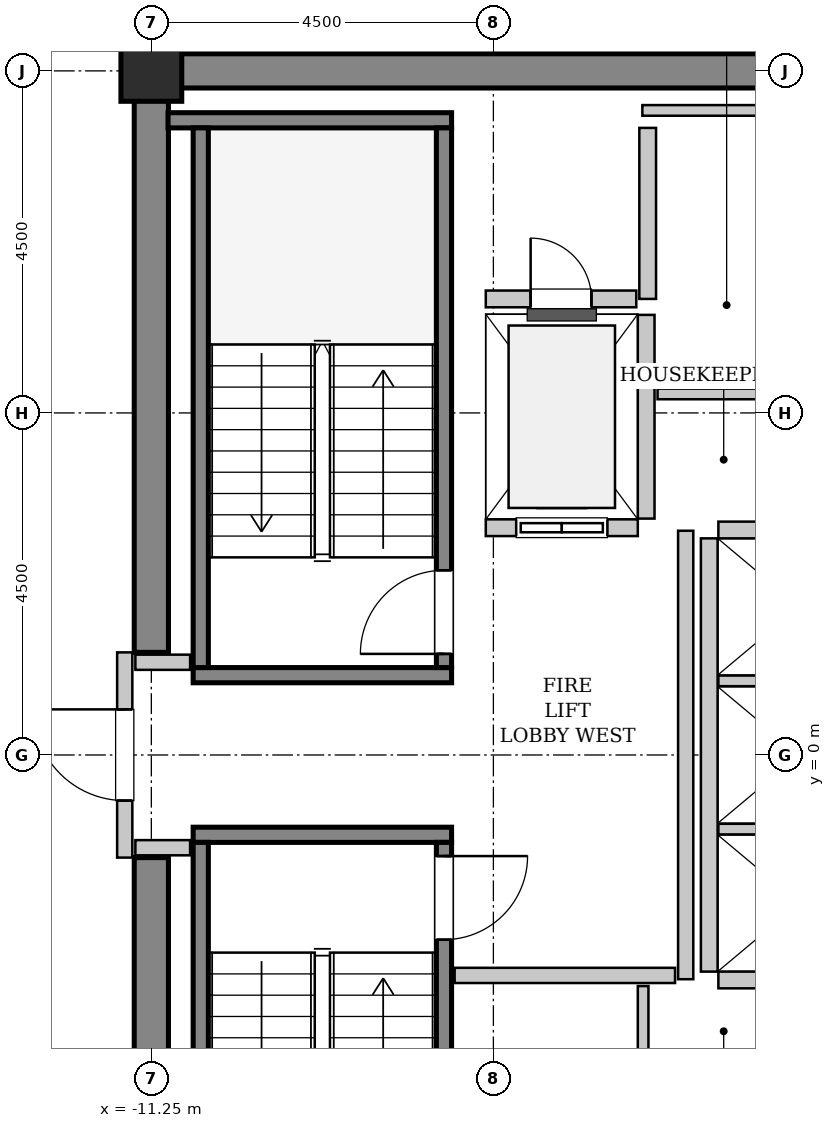
"""IFC4 building model, lengths in metres.
Left out: names, types, materials, properties, quantities, classifications, styles, units other than length and angle.
Written with IfcOpenShell. Run it as: python <this file> out.ifc"""

import sys

from ifc_helpers import new_model, si_unit, direction, frame, frame_2d, origin, origin_2d, place, context, subcontext, project, spatial, rectangle, hollow_rectangle, extrude, source, transform, mapped, element, fill, save


model = new_model("IFC4")
c1 = context("Model", 3, precision=1e-05, world=origin(), true_north=direction((0.0, 1.0)))
c2 = subcontext(c1, "Body", "Model", "MODEL_VIEW")
j1 = project(units=[si_unit("LENGTHUNIT", "METRE"), si_unit("PLANEANGLEUNIT", "RADIAN")], contexts=[c1])
p1 = place(None, origin())
s1 = spatial("IfcSite", under=j1, at=p1, CompositionType="ELEMENT")
p2 = place(p1, origin())
s2 = spatial("IfcBuilding", under=s1, at=p2, CompositionType="ELEMENT")
p3 = place(p2, frame((0.0, 0.0, 206.6)))
s3 = spatial("IfcBuildingStorey", under=s2, at=p3, CompositionType="ELEMENT", Elevation=206.6)
m1 = source(origin(), c2, "Body", "SweptSolid", [
    extrude(rectangle(XDim=9.925, YDim=0.45, at=frame_2d((4.962, 0.0))), origin(), (0.0, 0.0, 1.0), 3.8),
])
p4 = place(p3, frame((-11.475, 9.0, 0.0), z_axis=(0.0, 0.0, 1.0), x_axis=(1.0, 0.0, 0.0)))
e1 = element("IfcWall", 1, at=p4, inside=s3, PredefinedType="SHEAR", context=c2, shape_type="MappedRepresentation", body=[
    mapped(m1, transform((0.0, 0.0, 0.0), x_axis=(1.0, 0.0, 0.0), y_axis=(0.0, 1.0, 0.0), z_axis=(0.0, 0.0, 1.0), scale=1.0)),
])
m2 = source(origin(), c2, "Body", "SweptSolid", [
    extrude(rectangle(XDim=7.425, YDim=0.45, at=frame_2d((3.712, 0.0))), origin(), (0.0, 0.0, 1.0), 3.8),
])
for number, where, z_axis, x_axis in (
    (2, (-11.25, -8.775, 0.0), (0.0, 0.0, 1.0), (0.0, 1.0, 0.0)),
    (3, (-11.25, 1.35, 0.0), (0.0, 0.0, 1.0), (0.0, 1.0, 0.0)),
):
    element("IfcWall", number, at=place(p3, frame(where, z_axis=z_axis, x_axis=x_axis)), inside=s3, PredefinedType="SHEAR", context=c2, shape_type="MappedRepresentation", body=[
        mapped(m2, transform((0.0, 0.0, 0.0), x_axis=(1.0, 0.0, 0.0), y_axis=(0.0, 1.0, 0.0), z_axis=(0.0, 0.0, 1.0), scale=1.0)),
    ])
m3 = source(origin(), c2, "Body", "SweptSolid", [
    extrude(hollow_rectangle(XDim=0.8, YDim=0.8, WallThickness=0.04, InnerFilletRadius=0.04, OuterFilletRadius=0.08, at=origin_2d()), origin(), (0.0, 0.0, 1.0), 3.8),
])
p5 = place(p3, frame((-11.25, 9.0, 0.0), z_axis=(0.0, 0.0, 1.0), x_axis=(1.0, 0.0, 0.0)))
e4 = element("IfcColumn", 4, at=p5, inside=s3, PredefinedType="COLUMN", context=c2, shape_type="MappedRepresentation", body=[
    mapped(m3, transform((0.0, 0.0, 0.0), x_axis=(1.0, 0.0, 0.0), y_axis=(0.0, 1.0, 0.0), z_axis=(0.0, 0.0, 1.0), scale=1.0)),
])
m4 = source(origin(), c2, "Body", "SweptSolid", [
    extrude(rectangle(XDim=3.4, YDim=0.2, at=frame_2d((1.7, 0.0))), origin(), (0.0, 0.0, 1.0), 3.8),
])
p6 = place(p3, frame((-7.3, 1.05, 0.0), z_axis=(0.0, 0.0, 1.0), x_axis=(-1.0, 0.0, 0.0)))
e5 = element("IfcWall", 5, at=p6, inside=s3, PredefinedType="SOLIDWALL", context=c2, shape_type="MappedRepresentation", body=[
    mapped(m4, transform((0.0, 0.0, 0.0), x_axis=(1.0, 0.0, 0.0), y_axis=(0.0, 1.0, 0.0), z_axis=(0.0, 0.0, 1.0), scale=1.0)),
])
m5 = source(origin(), c2, "Body", "SweptSolid", [
    extrude(rectangle(XDim=3.73, YDim=0.2, at=frame_2d((1.865, 0.0))), origin(), (0.0, 0.0, 1.0), 3.8),
])
p7 = place(p3, frame((-7.3, 8.35, 0.0), z_axis=(0.0, 0.0, 1.0), x_axis=(-1.0, 0.0, 0.0)))
e6 = element("IfcWall", 6, at=p7, inside=s3, PredefinedType="SOLIDWALL", context=c2, shape_type="MappedRepresentation", body=[
    mapped(m5, transform((0.0, 0.0, 0.0), x_axis=(1.0, 0.0, 0.0), y_axis=(0.0, 1.0, 0.0), z_axis=(0.0, 0.0, 1.0), scale=1.0)),
])
m6 = source(origin(), c2, "Body", "SweptSolid", [
    extrude(rectangle(XDim=7.1, YDim=0.2, at=frame_2d((3.55, 0.0))), origin(), (0.0, 0.0, 1.0), 3.8),
])
p8 = place(p3, frame((-7.4, 1.15, 0.0), z_axis=(0.0, 0.0, 1.0), x_axis=(0.0, 1.0, 0.0)))
e7 = element("IfcWall", 7, at=p8, inside=s3, PredefinedType="SOLIDWALL", context=c2, shape_type="MappedRepresentation", body=[
    mapped(m6, transform((0.0, 0.0, 0.0), x_axis=(1.0, 0.0, 0.0), y_axis=(0.0, 1.0, 0.0), z_axis=(0.0, 0.0, 1.0), scale=1.0)),
])
p9 = place(p8, frame((0.18, 0.0, 0.0)))
e8 = element("IfcOpeningElement", 8, at=p9, cuts=e7, PredefinedType="OPENING", context=c2, shape_type="SweptSolid", body=[
    extrude(rectangle(XDim=1.1, YDim=2.15, at=frame_2d((0.55, 1.075))), frame((0.0, 0.11, 0.0), z_axis=(0.0, -1.0, 0.0), x_axis=(1.0, 0.0, 0.0)), (0.0, 0.0, 1.0), 0.22),
])
p10 = place(p3, frame((-10.6, 1.15, 0.0), z_axis=(0.0, 0.0, 1.0), x_axis=(0.0, 1.0, 0.0)))
e9 = element("IfcWall", 9, at=p10, inside=s3, PredefinedType="SOLIDWALL", context=c2, shape_type="MappedRepresentation", body=[
    mapped(m6, transform((0.0, 0.0, 0.0), x_axis=(1.0, 0.0, 0.0), y_axis=(0.0, 1.0, 0.0), z_axis=(0.0, 0.0, 1.0), scale=1.0)),
])
p11 = place(p3, frame((-10.7, -1.05, 0.0), z_axis=(0.0, 0.0, 1.0), x_axis=(1.0, 0.0, 0.0)))
e10 = element("IfcWall", 10, at=p11, inside=s3, PredefinedType="SOLIDWALL", context=c2, shape_type="MappedRepresentation", body=[
    mapped(m4, transform((0.0, 0.0, 0.0), x_axis=(1.0, 0.0, 0.0), y_axis=(0.0, 1.0, 0.0), z_axis=(0.0, 0.0, 1.0), scale=1.0)),
])
p12 = place(p3, frame((-10.6, -1.15, 0.0), z_axis=(0.0, 0.0, 1.0), x_axis=(0.0, -1.0, 0.0)))
e11 = element("IfcWall", 11, at=p12, inside=s3, PredefinedType="SOLIDWALL", context=c2, shape_type="MappedRepresentation", body=[
    mapped(m6, transform((0.0, 0.0, 0.0), x_axis=(1.0, 0.0, 0.0), y_axis=(0.0, 1.0, 0.0), z_axis=(0.0, 0.0, 1.0), scale=1.0)),
])
p13 = place(p3, frame((-7.4, -1.15, 0.0), z_axis=(0.0, 0.0, 1.0), x_axis=(0.0, -1.0, 0.0)))
e12 = element("IfcWall", 12, at=p13, inside=s3, PredefinedType="SOLIDWALL", context=c2, shape_type="MappedRepresentation", body=[
    mapped(m6, transform((0.0, 0.0, 0.0), x_axis=(1.0, 0.0, 0.0), y_axis=(0.0, 1.0, 0.0), z_axis=(0.0, 0.0, 1.0), scale=1.0)),
])
p14 = place(p13, frame((0.18, 0.0, 0.0)))
e13 = element("IfcOpeningElement", 13, at=p14, cuts=e12, PredefinedType="OPENING", context=c2, shape_type="SweptSolid", body=[
    extrude(rectangle(XDim=1.1, YDim=2.15, at=frame_2d((0.55, 1.075))), frame((0.0, 0.11, 0.0), z_axis=(0.0, -1.0, 0.0), x_axis=(1.0, 0.0, 0.0)), (0.0, 0.0, 1.0), 0.22),
])
m7 = source(origin(), c2, "Body", "SweptSolid", [
    extrude(rectangle(XDim=2.0, YDim=0.22, at=frame_2d((1.0, 0.0))), origin(), (0.0, 0.0, 1.0), 3.535),
])
p15 = place(p3, frame((-6.85, 2.99, 0.0), z_axis=(0.0, 0.0, 1.0), x_axis=(1.0, 0.0, 0.0)))
e14 = element("IfcWall", 14, at=p15, inside=s3, PredefinedType="SOLIDWALL", context=c2, shape_type="MappedRepresentation", body=[
    mapped(m7, transform((0.0, 0.0, 0.0), x_axis=(1.0, 0.0, 0.0), y_axis=(0.0, 1.0, 0.0), z_axis=(0.0, 0.0, 1.0), scale=1.0)),
])
p16 = place(p15, frame((0.4, 0.0, 0.0)))
e15 = element("IfcOpeningElement", 15, at=p16, cuts=e14, PredefinedType="OPENING", context=c2, shape_type="SweptSolid", body=[
    extrude(rectangle(XDim=1.2, YDim=2.2, at=frame_2d((0.6, 1.1))), frame((0.0, 0.12, 0.0), z_axis=(0.0, -1.0, 0.0), x_axis=(1.0, 0.0, 0.0)), (0.0, 0.0, 1.0), 0.24),
])
m8 = source(origin(), c2, "Body", "SweptSolid", [
    extrude(rectangle(XDim=2.68, YDim=0.22, at=frame_2d((1.34, 0.0))), origin(), (0.0, 0.0, 1.0), 3.535),
])
p17 = place(p3, frame((-4.74, 3.11, 0.0), z_axis=(0.0, 0.0, 1.0), x_axis=(0.0, 1.0, 0.0)))
e16 = element("IfcWall", 16, at=p17, inside=s3, PredefinedType="SOLIDWALL", context=c2, shape_type="MappedRepresentation", body=[
    mapped(m8, transform((0.0, 0.0, 0.0), x_axis=(1.0, 0.0, 0.0), y_axis=(0.0, 1.0, 0.0), z_axis=(0.0, 0.0, 1.0), scale=1.0)),
])
m9 = source(origin(), c2, "Body", "SweptSolid", [
    extrude(rectangle(XDim=5.7, YDim=0.22, at=frame_2d((2.85, 0.0))), origin(), (0.0, 0.0, 1.0), 3.535),
])
p18 = place(p3, frame((-3.91, 2.85, 0.0), z_axis=(0.0, 0.0, 1.0), x_axis=(0.0, -1.0, 0.0)))
e17 = element("IfcWall", 17, at=p18, inside=s3, PredefinedType="SOLIDWALL", context=c2, shape_type="MappedRepresentation", body=[
    mapped(m9, transform((0.0, 0.0, 0.0), x_axis=(1.0, 0.0, 0.0), y_axis=(0.0, 1.0, 0.0), z_axis=(0.0, 0.0, 1.0), scale=1.0)),
])
m10 = source(origin(), c2, "Body", "SweptSolid", [
    extrude(rectangle(XDim=2.13, YDim=0.22, at=frame_2d((1.065, 0.0))), origin(), (0.0, 0.0, 1.0), 3.535),
])
p19 = place(p3, frame((-3.79, -2.96, 0.0), z_axis=(0.0, 0.0, 1.0), x_axis=(1.0, 0.0, 0.0)))
e18 = element("IfcWall", 18, at=p19, inside=s3, PredefinedType="SOLIDWALL", context=c2, shape_type="MappedRepresentation", body=[
    mapped(m10, transform((0.0, 0.0, 0.0), x_axis=(1.0, 0.0, 0.0), y_axis=(0.0, 1.0, 0.0), z_axis=(0.0, 0.0, 1.0), scale=1.0)),
])
m11 = source(origin(), c2, "Body", "SweptSolid", [
    extrude(rectangle(XDim=2.13, YDim=0.14, at=frame_2d((1.065, 0.0))), origin(), (0.0, 0.0, 1.0), 3.535),
])
for number, where, z_axis, x_axis in (
    (19, (-3.79, -0.975, 0.0), (0.0, 0.0, 1.0), (1.0, 0.0, 0.0)),
    (20, (-3.79, 0.975, 0.0), (0.0, 0.0, 1.0), (1.0, 0.0, 0.0)),
):
    element("IfcWall", number, at=place(p3, frame(where, z_axis=z_axis, x_axis=x_axis)), inside=s3, PredefinedType="PARTITIONING", context=c2, shape_type="MappedRepresentation", body=[
        mapped(m11, transform((0.0, 0.0, 0.0), x_axis=(1.0, 0.0, 0.0), y_axis=(0.0, 1.0, 0.0), z_axis=(0.0, 0.0, 1.0), scale=1.0)),
    ])
p20 = place(p3, frame((-1.66, 2.96, 0.0), z_axis=(0.0, 0.0, 1.0), x_axis=(-1.0, 0.0, 0.0)))
e21 = element("IfcWall", 21, at=p20, inside=s3, PredefinedType="SOLIDWALL", context=c2, shape_type="MappedRepresentation", body=[
    mapped(m10, transform((0.0, 0.0, 0.0), x_axis=(1.0, 0.0, 0.0), y_axis=(0.0, 1.0, 0.0), z_axis=(0.0, 0.0, 1.0), scale=1.0)),
])
m12 = source(origin(), c2, "Body", "SweptSolid", [
    extrude(rectangle(XDim=2.25, YDim=0.22, at=frame_2d((1.125, 0.0))), origin(), (0.0, 0.0, 1.0), 3.535),
])
p21 = place(p3, frame((-4.72, 6.0, 0.0), z_axis=(0.0, 0.0, 1.0), x_axis=(0.0, 1.0, 0.0)))
e22 = element("IfcWall", 22, at=p21, inside=s3, PredefinedType="SOLIDWALL", context=c2, shape_type="MappedRepresentation", body=[
    mapped(m12, transform((0.0, 0.0, 0.0), x_axis=(1.0, 0.0, 0.0), y_axis=(0.0, 1.0, 0.0), z_axis=(0.0, 0.0, 1.0), scale=1.0)),
])
m13 = source(origin(), c2, "Body", "SweptSolid", [
    extrude(rectangle(XDim=1.98, YDim=0.22, at=frame_2d((0.99, 0.0))), origin(), (0.0, 0.0, 1.0), 3.535),
])
p22 = place(p3, frame((-6.85, 6.0, 0.0), z_axis=(0.0, 0.0, 1.0), x_axis=(1.0, 0.0, 0.0)))
e23 = element("IfcWall", 23, at=p22, inside=s3, PredefinedType="SOLIDWALL", context=c2, shape_type="MappedRepresentation", body=[
    mapped(m13, transform((0.0, 0.0, 0.0), x_axis=(1.0, 0.0, 0.0), y_axis=(0.0, 1.0, 0.0), z_axis=(0.0, 0.0, 1.0), scale=1.0)),
])
p23 = place(p22, frame((0.59, 0.0, 0.0)))
e24 = element("IfcOpeningElement", 24, at=p23, cuts=e23, PredefinedType="OPENING", context=c2, shape_type="SweptSolid", body=[
    extrude(rectangle(XDim=0.8, YDim=2.0, at=frame_2d((0.4, 1.0))), frame((0.0, 0.12, 0.0), z_axis=(0.0, -1.0, 0.0), x_axis=(1.0, 0.0, 0.0)), (0.0, 0.0, 1.0), 0.24),
])
m14 = source(origin(), c2, "Body", "SweptSolid", [
    extrude(rectangle(XDim=2.7, YDim=0.2, at=frame_2d((1.35, 0.0))), origin(), (0.0, 0.0, 1.0), 2.625),
])
p24 = place(p3, frame((-11.6, -1.35, 0.0), z_axis=(0.0, 0.0, 1.0), x_axis=(0.0, 1.0, 0.0)))
e25 = element("IfcWall", 25, at=p24, inside=s3, PredefinedType="PARTITIONING", context=c2, shape_type="MappedRepresentation", body=[
    mapped(m14, transform((0.0, 0.0, 0.0), x_axis=(1.0, 0.0, 0.0), y_axis=(0.0, 1.0, 0.0), z_axis=(0.0, 0.0, 1.0), scale=1.0)),
])
p25 = place(p24, frame((0.75, 0.0, 0.0)))
e26 = element("IfcOpeningElement", 26, at=p25, cuts=e25, PredefinedType="OPENING", context=c2, shape_type="SweptSolid", body=[
    extrude(rectangle(XDim=1.2, YDim=2.15, at=frame_2d((0.6, 1.075))), frame((0.0, 0.11, 0.0), z_axis=(0.0, -1.0, 0.0), x_axis=(1.0, 0.0, 0.0)), (0.0, 0.0, 1.0), 0.22),
])
m15 = source(origin(), c2, "Body", "SweptSolid", [
    extrude(rectangle(XDim=5.9, YDim=0.2, at=frame_2d((2.95, 0.0))), origin(), (0.0, 0.0, 1.0), 3.535),
])
p26 = place(p3, frame((-4.22, -2.95, 0.0), z_axis=(0.0, 0.0, 1.0), x_axis=(0.0, 1.0, 0.0)))
e27 = element("IfcWall", 27, at=p26, inside=s3, PredefinedType="PARTITIONING", context=c2, shape_type="MappedRepresentation", body=[
    mapped(m15, transform((0.0, 0.0, 0.0), x_axis=(1.0, 0.0, 0.0), y_axis=(0.0, 1.0, 0.0), z_axis=(0.0, 0.0, 1.0), scale=1.0)),
])
m16 = source(origin(), c2, "Body", "SweptSolid", [
    extrude(rectangle(XDim=2.9, YDim=0.2, at=frame_2d((1.45, 0.0))), origin(), (0.0, 0.0, 1.0), 3.535),
])
p27 = place(p3, frame((-7.26, -2.9, 0.0), z_axis=(0.0, 0.0, 1.0), x_axis=(1.0, 0.0, 0.0)))
e28 = element("IfcWall", 28, at=p27, inside=s3, PredefinedType="PARTITIONING", context=c2, shape_type="MappedRepresentation", body=[
    mapped(m16, transform((0.0, 0.0, 0.0), x_axis=(1.0, 0.0, 0.0), y_axis=(0.0, 1.0, 0.0), z_axis=(0.0, 0.0, 1.0), scale=1.0)),
])
m17 = source(origin(), c2, "Body", "SweptSolid", [
    extrude(rectangle(XDim=0.72, YDim=0.2, at=frame_2d((0.36, 0.0))), origin(), (0.0, 0.0, 1.0), 3.535),
])
for number, where, z_axis, x_axis in (
    (29, (-11.46, 1.22, 0.0), (0.0, 0.0, 1.0), (1.0, 0.0, 0.0)),
    (30, (-11.46, -1.22, 0.0), (0.0, 0.0, 1.0), (1.0, 0.0, 0.0)),
):
    element("IfcWall", number, at=place(p3, frame(where, z_axis=z_axis, x_axis=x_axis)), inside=s3, PredefinedType="PARTITIONING", context=c2, shape_type="MappedRepresentation", body=[
        mapped(m17, transform((0.0, 0.0, 0.0), x_axis=(1.0, 0.0, 0.0), y_axis=(0.0, 1.0, 0.0), z_axis=(0.0, 0.0, 1.0), scale=1.0)),
    ])
m18 = source(origin(), c2, "Body", "SweptSolid", [
    extrude(rectangle(XDim=2.95, YDim=0.14, at=frame_2d((1.475, 0.0))), origin(), (0.0, 0.0, 1.0), 3.535),
])
p28 = place(p3, frame((-4.59, 4.75, 0.0), z_axis=(0.0, 0.0, 1.0), x_axis=(1.0, 0.0, 0.0)))
e31 = element("IfcWall", 31, at=p28, inside=s3, PredefinedType="PARTITIONING", context=c2, shape_type="MappedRepresentation", body=[
    mapped(m18, transform((0.0, 0.0, 0.0), x_axis=(1.0, 0.0, 0.0), y_axis=(0.0, 1.0, 0.0), z_axis=(0.0, 0.0, 1.0), scale=1.0)),
])
m19 = source(origin(), c2, "Body", "SweptSolid", [
    extrude(rectangle(XDim=3.15, YDim=0.14, at=frame_2d((1.575, 0.0))), origin(), (0.0, 0.0, 1.0), 3.535),
])
p29 = place(p3, frame((-4.79, 8.48, 0.0), z_axis=(0.0, 0.0, 1.0), x_axis=(1.0, 0.0, 0.0)))
e32 = element("IfcWall", 32, at=p29, inside=s3, PredefinedType="PARTITIONING", context=c2, shape_type="MappedRepresentation", body=[
    mapped(m19, transform((0.0, 0.0, 0.0), x_axis=(1.0, 0.0, 0.0), y_axis=(0.0, 1.0, 0.0), z_axis=(0.0, 0.0, 1.0), scale=1.0)),
])
m20 = source(origin(), c2, "Body", "SweptSolid", [
    extrude(rectangle(XDim=1.1, YDim=0.14, at=frame_2d((0.55, 0.0))), origin(), (0.0, 0.0, 1.0), 3.535),
])
p30 = place(p3, frame((-4.78, -4.14, 0.0), z_axis=(0.0, 0.0, 1.0), x_axis=(0.0, 1.0, 0.0)))
e33 = element("IfcWall", 33, at=p30, inside=s3, PredefinedType="PARTITIONING", context=c2, shape_type="MappedRepresentation", body=[
    mapped(m20, transform((0.0, 0.0, 0.0), x_axis=(1.0, 0.0, 0.0), y_axis=(0.0, 1.0, 0.0), z_axis=(0.0, 0.0, 1.0), scale=1.0)),
])
m21 = source(origin(), c2, "Body", "SweptSolid", [
    extrude(rectangle(XDim=1.1, YDim=2.15, at=frame_2d((0.55, 1.075))), frame((0.0, 0.025, 0.0), z_axis=(0.0, -1.0, 0.0), x_axis=(1.0, 0.0, 0.0)), (0.0, 0.0, 1.0), 0.05),
])
p31 = place(p9, origin())
e34 = element("IfcDoor", 34, at=p31, inside=s3, OperationType="SINGLE_SWING_LEFT", PredefinedType="DOOR", context=c2, shape_type="MappedRepresentation", body=[
    mapped(m21, transform((0.0, 0.0, 0.0), x_axis=(1.0, 0.0, 0.0), y_axis=(0.0, 1.0, 0.0), z_axis=(0.0, 0.0, 1.0), scale=1.0)),
])
fill(e8, e34)
p32 = place(p14, origin())
e35 = element("IfcDoor", 35, at=p32, inside=s3, OperationType="SINGLE_SWING_LEFT", PredefinedType="DOOR", context=c2, shape_type="MappedRepresentation", body=[
    mapped(m21, transform((0.0, 0.0, 0.0), x_axis=(1.0, 0.0, 0.0), y_axis=(0.0, 1.0, 0.0), z_axis=(0.0, 0.0, 1.0), scale=1.0)),
])
fill(e13, e35)
m22 = source(origin(), c2, "Body", "SweptSolid", [
    extrude(rectangle(XDim=1.2, YDim=2.2, at=frame_2d((0.6, 1.1))), frame((0.0, 0.025, 0.0), z_axis=(0.0, -1.0, 0.0), x_axis=(1.0, 0.0, 0.0)), (0.0, 0.0, 1.0), 0.05),
])
p33 = place(p16, origin())
e36 = element("IfcDoor", 36, at=p33, inside=s3, OperationType="SLIDING_TO_LEFT", PredefinedType="DOOR", context=c2, shape_type="MappedRepresentation", body=[
    mapped(m22, transform((0.0, 0.0, 0.0), x_axis=(1.0, 0.0, 0.0), y_axis=(0.0, 1.0, 0.0), z_axis=(0.0, 0.0, 1.0), scale=1.0)),
])
fill(e15, e36)
m23 = source(origin(), c2, "Body", "SweptSolid", [
    extrude(rectangle(XDim=0.8, YDim=2.0, at=frame_2d((0.4, 1.0))), frame((0.0, 0.025, 0.0), z_axis=(0.0, -1.0, 0.0), x_axis=(1.0, 0.0, 0.0)), (0.0, 0.0, 1.0), 0.05),
])
p34 = place(p23, origin())
e37 = element("IfcDoor", 37, at=p34, inside=s3, OperationType="SINGLE_SWING_LEFT", PredefinedType="TRAPDOOR", context=c2, shape_type="MappedRepresentation", body=[
    mapped(m23, transform((0.0, 0.0, 0.0), x_axis=(1.0, 0.0, 0.0), y_axis=(0.0, 1.0, 0.0), z_axis=(0.0, 0.0, 1.0), scale=1.0)),
])
fill(e24, e37)
m24 = source(origin(), c2, "Body", "SweptSolid", [
    extrude(rectangle(XDim=1.2, YDim=2.15, at=frame_2d((0.6, 1.075))), frame((0.0, 0.025, 0.0), z_axis=(0.0, -1.0, 0.0), x_axis=(1.0, 0.0, 0.0)), (0.0, 0.0, 1.0), 0.05),
])
p35 = place(p25, origin())
e38 = element("IfcDoor", 38, at=p35, inside=s3, OperationType="SINGLE_SWING_RIGHT", PredefinedType="DOOR", context=c2, shape_type="MappedRepresentation", body=[
    mapped(m24, transform((0.0, 0.0, 0.0), x_axis=(1.0, 0.0, 0.0), y_axis=(0.0, 1.0, 0.0), z_axis=(0.0, 0.0, 1.0), scale=1.0)),
])
fill(e26, e38)
save(model, sys.argv[1])
